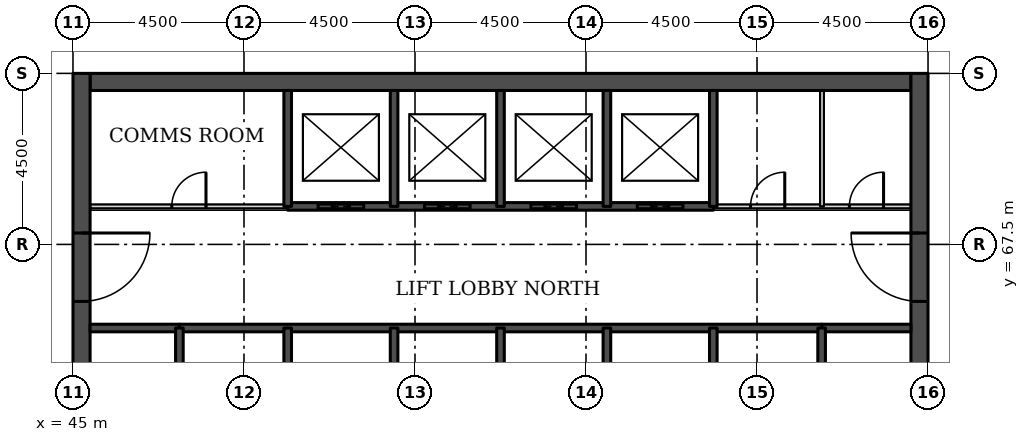
"""IFC4 building model, lengths in metres.
Left out: names, types, materials, properties, quantities, classifications, styles, units other than length and angle.
Written with IfcOpenShell. Run it as: python <this file> out.ifc"""

import sys

from ifc_helpers import new_model, si_unit, direction, frame, frame_2d, origin, place, context, subcontext, project, spatial, rectangle, extrude, element, fill, save


model = new_model("IFC4")
c1 = context("Model", 3, precision=1e-05, world=origin(), true_north=direction((0.0, 1.0)))
c2 = subcontext(c1, "Body", "Model", "MODEL_VIEW")
j1 = project(units=[si_unit("LENGTHUNIT", "METRE"), si_unit("PLANEANGLEUNIT", "RADIAN")], contexts=[c1])
p1 = place(None, origin())
s1 = spatial("IfcSite", under=j1, at=p1, CompositionType="ELEMENT")
p2 = place(p1, origin())
s2 = spatial("IfcBuilding", under=s1, at=p2, CompositionType="ELEMENT")
p3 = place(p2, frame((0.0, 0.0, 93.7)))
s3 = spatial("IfcBuildingStorey", under=s2, at=p3, CompositionType="ELEMENT", Elevation=93.7)
p4 = place(p3, frame((45.45, 71.775, 0.0), z_axis=(0.0, 0.0, 1.0), x_axis=(1.0, 0.0, 0.0)))
e1 = element("IfcWall", 1, at=p4, inside=s3, PredefinedType="SHEAR", context=c2, shape_type="SweptSolid", body=[
    extrude(rectangle(XDim=21.6, YDim=0.45, at=frame_2d((10.8, 0.0))), origin(), (0.0, 0.0, 1.0), 3.7),
])
p5 = place(p3, frame((45.225, 49.5, 0.0), z_axis=(0.0, 0.0, 1.0), x_axis=(0.0, 1.0, 0.0)))
e2 = element("IfcWall", 2, at=p5, inside=s3, PredefinedType="SHEAR", context=c2, shape_type="SweptSolid", body=[
    extrude(rectangle(XDim=22.5, YDim=0.45, at=frame_2d((11.25, 0.0))), origin(), (0.0, 0.0, 1.0), 3.7),
])
p6 = place(p5, frame((4.2, 0.0, 0.0)))
e3 = element("IfcOpeningElement", 3, at=p6, cuts=e2, PredefinedType="OPENING", context=c2, shape_type="SweptSolid", body=[
    extrude(rectangle(XDim=1.8, YDim=2.1, at=frame_2d((0.9, 1.05))), frame((0.0, 0.235, 0.0), z_axis=(0.0, -1.0, 0.0), x_axis=(1.0, 0.0, 0.0)), (0.0, 0.0, 1.0), 0.47),
])
p7 = place(p5, frame((6.9, 0.0, 0.0)))
e4 = element("IfcOpeningElement", 4, at=p7, cuts=e2, PredefinedType="OPENING", context=c2, shape_type="SweptSolid", body=[
    extrude(rectangle(XDim=1.1, YDim=2.1, at=frame_2d((0.55, 1.05))), frame((0.0, 0.235, 0.0), z_axis=(0.0, -1.0, 0.0), x_axis=(1.0, 0.0, 0.0)), (0.0, 0.0, 1.0), 0.47),
])
p8 = place(p5, frame((13.6, 0.0, 0.0)))
e5 = element("IfcOpeningElement", 5, at=p8, cuts=e2, PredefinedType="OPENING", context=c2, shape_type="SweptSolid", body=[
    extrude(rectangle(XDim=1.1, YDim=2.1, at=frame_2d((0.55, 1.05))), frame((0.0, 0.235, 0.0), z_axis=(0.0, -1.0, 0.0), x_axis=(1.0, 0.0, 0.0)), (0.0, 0.0, 1.0), 0.47),
])
p9 = place(p5, frame((16.5, 0.0, 0.0)))
e6 = element("IfcOpeningElement", 6, at=p9, cuts=e2, PredefinedType="OPENING", context=c2, shape_type="SweptSolid", body=[
    extrude(rectangle(XDim=1.8, YDim=2.1, at=frame_2d((0.9, 1.05))), frame((0.0, 0.235, 0.0), z_axis=(0.0, -1.0, 0.0), x_axis=(1.0, 0.0, 0.0)), (0.0, 0.0, 1.0), 0.47),
])
p10 = place(p3, frame((67.275, 49.5, 0.0), z_axis=(0.0, 0.0, 1.0), x_axis=(0.0, 1.0, 0.0)))
e7 = element("IfcWall", 7, at=p10, inside=s3, PredefinedType="SHEAR", context=c2, shape_type="SweptSolid", body=[
    extrude(rectangle(XDim=22.5, YDim=0.45, at=frame_2d((11.25, 0.0))), origin(), (0.0, 0.0, 1.0), 3.7),
])
p11 = place(p10, frame((4.2, 0.0, 0.0)))
e8 = element("IfcOpeningElement", 8, at=p11, cuts=e7, PredefinedType="OPENING", context=c2, shape_type="SweptSolid", body=[
    extrude(rectangle(XDim=1.8, YDim=2.1, at=frame_2d((0.9, 1.05))), frame((0.0, 0.235, 0.0), z_axis=(0.0, -1.0, 0.0), x_axis=(1.0, 0.0, 0.0)), (0.0, 0.0, 1.0), 0.47),
])
p12 = place(p10, frame((6.9, 0.0, 0.0)))
e9 = element("IfcOpeningElement", 9, at=p12, cuts=e7, PredefinedType="OPENING", context=c2, shape_type="SweptSolid", body=[
    extrude(rectangle(XDim=1.1, YDim=2.1, at=frame_2d((0.55, 1.05))), frame((0.0, 0.235, 0.0), z_axis=(0.0, -1.0, 0.0), x_axis=(1.0, 0.0, 0.0)), (0.0, 0.0, 1.0), 0.47),
])
p13 = place(p10, frame((13.6, 0.0, 0.0)))
e10 = element("IfcOpeningElement", 10, at=p13, cuts=e7, PredefinedType="OPENING", context=c2, shape_type="SweptSolid", body=[
    extrude(rectangle(XDim=1.1, YDim=2.1, at=frame_2d((0.55, 1.05))), frame((0.0, 0.235, 0.0), z_axis=(0.0, -1.0, 0.0), x_axis=(1.0, 0.0, 0.0)), (0.0, 0.0, 1.0), 0.47),
])
p14 = place(p10, frame((16.5, 0.0, 0.0)))
e11 = element("IfcOpeningElement", 11, at=p14, cuts=e7, PredefinedType="OPENING", context=c2, shape_type="SweptSolid", body=[
    extrude(rectangle(XDim=1.8, YDim=2.1, at=frame_2d((0.9, 1.05))), frame((0.0, 0.235, 0.0), z_axis=(0.0, -1.0, 0.0), x_axis=(1.0, 0.0, 0.0)), (0.0, 0.0, 1.0), 0.47),
])
for number, where, z_axis, x_axis in (
    (12, (45.45, 65.3, 0.0), (0.0, 0.0, 1.0), (1.0, 0.0, 0.0)),
    (13, (64.7, 65.3, 0.0), (0.0, 0.0, 1.0), (1.0, 0.0, 0.0)),
):
    element("IfcWall", number, at=place(p3, frame(where, z_axis=z_axis, x_axis=x_axis)), inside=s3, PredefinedType="SOLIDWALL", context=c2, shape_type="SweptSolid", body=[
        extrude(rectangle(XDim=2.35, YDim=0.2, at=frame_2d((1.175, 0.0))), origin(), (0.0, 0.0, 1.0), 3.55),
    ])
p15 = place(p3, frame((47.8, 65.3, 0.0), z_axis=(0.0, 0.0, 1.0), x_axis=(1.0, 0.0, 0.0)))
e14 = element("IfcWall", 14, at=p15, inside=s3, PredefinedType="SOLIDWALL", context=c2, shape_type="SweptSolid", body=[
    extrude(rectangle(XDim=16.9, YDim=0.2, at=frame_2d((8.45, 0.0))), origin(), (0.0, 0.0, 1.0), 3.55),
])
p16 = place(p3, frame((45.45, 68.5, 0.0), z_axis=(0.0, 0.0, 1.0), x_axis=(1.0, 0.0, 0.0)))
e15 = element("IfcWall", 15, at=p16, inside=s3, PredefinedType="PARTITIONING", context=c2, shape_type="SweptSolid", body=[
    extrude(rectangle(XDim=5.2, YDim=0.1, at=frame_2d((2.6, 0.0))), origin(), (0.0, 0.0, 1.0), 3.55),
])
p17 = place(p16, frame((2.15, 0.0, 0.0)))
e16 = element("IfcOpeningElement", 16, at=p17, cuts=e15, PredefinedType="OPENING", context=c2, shape_type="SweptSolid", body=[
    extrude(rectangle(XDim=0.9, YDim=2.1, at=frame_2d((0.45, 1.05))), frame((0.0, 0.06, 0.0), z_axis=(0.0, -1.0, 0.0), x_axis=(1.0, 0.0, 0.0)), (0.0, 0.0, 1.0), 0.12),
])
p18 = place(p3, frame((61.85, 68.5, 0.0), z_axis=(0.0, 0.0, 1.0), x_axis=(1.0, 0.0, 0.0)))
e17 = element("IfcWall", 17, at=p18, inside=s3, PredefinedType="PARTITIONING", context=c2, shape_type="SweptSolid", body=[
    extrude(rectangle(XDim=5.2, YDim=0.1, at=frame_2d((2.6, 0.0))), origin(), (0.0, 0.0, 1.0), 3.55),
])
p19 = place(p18, frame((3.58, 0.0, 0.0)))
e18 = element("IfcOpeningElement", 18, at=p19, cuts=e17, PredefinedType="OPENING", context=c2, shape_type="SweptSolid", body=[
    extrude(rectangle(XDim=0.9, YDim=2.1, at=frame_2d((0.45, 1.05))), frame((0.0, 0.06, 0.0), z_axis=(0.0, -1.0, 0.0), x_axis=(1.0, 0.0, 0.0)), (0.0, 0.0, 1.0), 0.12),
])
p20 = place(p18, frame((0.98, 0.0, 0.0)))
e19 = element("IfcOpeningElement", 19, at=p20, cuts=e17, PredefinedType="OPENING", context=c2, shape_type="SweptSolid", body=[
    extrude(rectangle(XDim=0.9, YDim=2.1, at=frame_2d((0.45, 1.05))), frame((0.0, 0.06, 0.0), z_axis=(0.0, -1.0, 0.0), x_axis=(1.0, 0.0, 0.0)), (0.0, 0.0, 1.0), 0.12),
])
p21 = place(p3, frame((50.65, 68.5, 0.0), z_axis=(0.0, 0.0, 1.0), x_axis=(1.0, 0.0, 0.0)))
e20 = element("IfcWall", 20, at=p21, inside=s3, PredefinedType="SOLIDWALL", context=c2, shape_type="SweptSolid", body=[
    extrude(rectangle(XDim=11.2, YDim=0.2, at=frame_2d((5.6, 0.0))), origin(), (0.0, 0.0, 1.0), 3.55),
])
p22 = place(p21, frame((0.8, 0.0, 0.0)))
e21 = element("IfcOpeningElement", 21, at=p22, cuts=e20, PredefinedType="OPENING", context=c2, shape_type="SweptSolid", body=[
    extrude(rectangle(XDim=1.2, YDim=2.1, at=frame_2d((0.6, 1.05))), frame((0.0, 0.11, 0.0), z_axis=(0.0, -1.0, 0.0), x_axis=(1.0, 0.0, 0.0)), (0.0, 0.0, 1.0), 0.22),
])
p23 = place(p21, frame((3.6, 0.0, 0.0)))
e22 = element("IfcOpeningElement", 22, at=p23, cuts=e20, PredefinedType="OPENING", context=c2, shape_type="SweptSolid", body=[
    extrude(rectangle(XDim=1.2, YDim=2.1, at=frame_2d((0.6, 1.05))), frame((0.0, 0.11, 0.0), z_axis=(0.0, -1.0, 0.0), x_axis=(1.0, 0.0, 0.0)), (0.0, 0.0, 1.0), 0.22),
])
p24 = place(p21, frame((6.4, 0.0, 0.0)))
e23 = element("IfcOpeningElement", 23, at=p24, cuts=e20, PredefinedType="OPENING", context=c2, shape_type="SweptSolid", body=[
    extrude(rectangle(XDim=1.2, YDim=2.1, at=frame_2d((0.6, 1.05))), frame((0.0, 0.11, 0.0), z_axis=(0.0, -1.0, 0.0), x_axis=(1.0, 0.0, 0.0)), (0.0, 0.0, 1.0), 0.22),
])
p25 = place(p21, frame((9.2, 0.0, 0.0)))
e24 = element("IfcOpeningElement", 24, at=p25, cuts=e20, PredefinedType="OPENING", context=c2, shape_type="SweptSolid", body=[
    extrude(rectangle(XDim=1.2, YDim=2.1, at=frame_2d((0.6, 1.05))), frame((0.0, 0.11, 0.0), z_axis=(0.0, -1.0, 0.0), x_axis=(1.0, 0.0, 0.0)), (0.0, 0.0, 1.0), 0.22),
])
p26 = place(p3, frame((47.8, 62.0, 0.0), z_axis=(0.0, 0.0, 1.0), x_axis=(0.0, 1.0, 0.0)))
e25 = element("IfcWall", 25, at=p26, inside=s3, PredefinedType="SOLIDWALL", context=c2, shape_type="SweptSolid", body=[
    extrude(rectangle(XDim=3.3, YDim=0.2, at=frame_2d((1.65, 0.0))), origin(), (0.0, 0.0, 1.0), 3.55),
])
p27 = place(p26, frame((1.1, 0.0, 0.0)))
e26 = element("IfcOpeningElement", 26, at=p27, cuts=e25, PredefinedType="OPENING", context=c2, shape_type="SweptSolid", body=[
    extrude(rectangle(XDim=1.1, YDim=2.1, at=frame_2d((0.55, 1.05))), frame((0.0, 0.11, 0.0), z_axis=(0.0, -1.0, 0.0), x_axis=(1.0, 0.0, 0.0)), (0.0, 0.0, 1.0), 0.22),
])
p28 = place(p3, frame((50.65, 62.0, 0.0), z_axis=(0.0, 0.0, 1.0), x_axis=(0.0, 1.0, 0.0)))
e27 = element("IfcWall", 27, at=p28, inside=s3, PredefinedType="SOLIDWALL", context=c2, shape_type="SweptSolid", body=[
    extrude(rectangle(XDim=3.3, YDim=0.2, at=frame_2d((1.65, 0.0))), origin(), (0.0, 0.0, 1.0), 3.55),
])
p29 = place(p3, frame((50.65, 68.5, 0.0), z_axis=(0.0, 0.0, 1.0), x_axis=(0.0, 1.0, 0.0)))
e28 = element("IfcWall", 28, at=p29, inside=s3, PredefinedType="SOLIDWALL", context=c2, shape_type="SweptSolid", body=[
    extrude(rectangle(XDim=3.05, YDim=0.2, at=frame_2d((1.525, 0.0))), origin(), (0.0, 0.0, 1.0), 3.55),
])
p30 = place(p3, frame((53.45, 62.5, 0.0), z_axis=(0.0, 0.0, 1.0), x_axis=(0.0, 1.0, 0.0)))
e29 = element("IfcWall", 29, at=p30, inside=s3, PredefinedType="SOLIDWALL", context=c2, shape_type="SweptSolid", body=[
    extrude(rectangle(XDim=2.8, YDim=0.2, at=frame_2d((1.4, 0.0))), origin(), (0.0, 0.0, 1.0), 3.55),
])
p31 = place(p3, frame((53.45, 68.5, 0.0), z_axis=(0.0, 0.0, 1.0), x_axis=(0.0, 1.0, 0.0)))
e30 = element("IfcWall", 30, at=p31, inside=s3, PredefinedType="SOLIDWALL", context=c2, shape_type="SweptSolid", body=[
    extrude(rectangle(XDim=3.05, YDim=0.2, at=frame_2d((1.525, 0.0))), origin(), (0.0, 0.0, 1.0), 3.55),
])
p32 = place(p3, frame((56.25, 62.5, 0.0), z_axis=(0.0, 0.0, 1.0), x_axis=(0.0, 1.0, 0.0)))
e31 = element("IfcWall", 31, at=p32, inside=s3, PredefinedType="SOLIDWALL", context=c2, shape_type="SweptSolid", body=[
    extrude(rectangle(XDim=2.8, YDim=0.2, at=frame_2d((1.4, 0.0))), origin(), (0.0, 0.0, 1.0), 3.55),
])
p33 = place(p3, frame((56.25, 68.5, 0.0), z_axis=(0.0, 0.0, 1.0), x_axis=(0.0, 1.0, 0.0)))
e32 = element("IfcWall", 32, at=p33, inside=s3, PredefinedType="SOLIDWALL", context=c2, shape_type="SweptSolid", body=[
    extrude(rectangle(XDim=3.05, YDim=0.2, at=frame_2d((1.525, 0.0))), origin(), (0.0, 0.0, 1.0), 3.55),
])
p34 = place(p3, frame((59.05, 62.5, 0.0), z_axis=(0.0, 0.0, 1.0), x_axis=(0.0, 1.0, 0.0)))
e33 = element("IfcWall", 33, at=p34, inside=s3, PredefinedType="SOLIDWALL", context=c2, shape_type="SweptSolid", body=[
    extrude(rectangle(XDim=2.8, YDim=0.2, at=frame_2d((1.4, 0.0))), origin(), (0.0, 0.0, 1.0), 3.55),
])
p35 = place(p3, frame((59.05, 68.5, 0.0), z_axis=(0.0, 0.0, 1.0), x_axis=(0.0, 1.0, 0.0)))
e34 = element("IfcWall", 34, at=p35, inside=s3, PredefinedType="SOLIDWALL", context=c2, shape_type="SweptSolid", body=[
    extrude(rectangle(XDim=3.05, YDim=0.2, at=frame_2d((1.525, 0.0))), origin(), (0.0, 0.0, 1.0), 3.55),
])
p36 = place(p3, frame((61.85, 62.0, 0.0), z_axis=(0.0, 0.0, 1.0), x_axis=(0.0, 1.0, 0.0)))
e35 = element("IfcWall", 35, at=p36, inside=s3, PredefinedType="SOLIDWALL", context=c2, shape_type="SweptSolid", body=[
    extrude(rectangle(XDim=3.3, YDim=0.2, at=frame_2d((1.65, 0.0))), origin(), (0.0, 0.0, 1.0), 3.55),
])
p37 = place(p3, frame((61.85, 68.5, 0.0), z_axis=(0.0, 0.0, 1.0), x_axis=(0.0, 1.0, 0.0)))
e36 = element("IfcWall", 36, at=p37, inside=s3, PredefinedType="SOLIDWALL", context=c2, shape_type="SweptSolid", body=[
    extrude(rectangle(XDim=3.05, YDim=0.2, at=frame_2d((1.525, 0.0))), origin(), (0.0, 0.0, 1.0), 3.55),
])
p38 = place(p3, frame((64.7, 62.0, 0.0), z_axis=(0.0, 0.0, 1.0), x_axis=(0.0, 1.0, 0.0)))
e37 = element("IfcWall", 37, at=p38, inside=s3, PredefinedType="SOLIDWALL", context=c2, shape_type="SweptSolid", body=[
    extrude(rectangle(XDim=3.3, YDim=0.2, at=frame_2d((1.65, 0.0))), origin(), (0.0, 0.0, 1.0), 3.55),
])
p39 = place(p38, frame((1.1, 0.0, 0.0)))
e38 = element("IfcOpeningElement", 38, at=p39, cuts=e37, PredefinedType="OPENING", context=c2, shape_type="SweptSolid", body=[
    extrude(rectangle(XDim=1.1, YDim=2.1, at=frame_2d((0.55, 1.05))), frame((0.0, 0.11, 0.0), z_axis=(0.0, -1.0, 0.0), x_axis=(1.0, 0.0, 0.0)), (0.0, 0.0, 1.0), 0.22),
])
p40 = place(p3, frame((64.71, 68.5, 0.0), z_axis=(0.0, 0.0, 1.0), x_axis=(0.0, 1.0, 0.0)))
e39 = element("IfcWall", 39, at=p40, inside=s3, PredefinedType="PARTITIONING", context=c2, shape_type="SweptSolid", body=[
    extrude(rectangle(XDim=3.05, YDim=0.1, at=frame_2d((1.525, 0.0))), origin(), (0.0, 0.0, 1.0), 3.55),
])
p41 = place(p22, origin())
e40 = element("IfcDoor", 40, at=p41, inside=s3, OperationType="DOUBLE_DOOR_SLIDING", PredefinedType="DOOR", context=c2, shape_type="SweptSolid", body=[
    extrude(rectangle(XDim=1.2, YDim=2.1, at=frame_2d((0.6, 1.05))), frame((0.0, 0.025, 0.0), z_axis=(0.0, -1.0, 0.0), x_axis=(1.0, 0.0, 0.0)), (0.0, 0.0, 1.0), 0.05),
])
fill(e21, e40)
p42 = place(p23, origin())
e41 = element("IfcDoor", 41, at=p42, inside=s3, OperationType="DOUBLE_DOOR_SLIDING", PredefinedType="DOOR", context=c2, shape_type="SweptSolid", body=[
    extrude(rectangle(XDim=1.2, YDim=2.1, at=frame_2d((0.6, 1.05))), frame((0.0, 0.025, 0.0), z_axis=(0.0, -1.0, 0.0), x_axis=(1.0, 0.0, 0.0)), (0.0, 0.0, 1.0), 0.05),
])
fill(e22, e41)
p43 = place(p24, origin())
e42 = element("IfcDoor", 42, at=p43, inside=s3, OperationType="DOUBLE_DOOR_SLIDING", PredefinedType="DOOR", context=c2, shape_type="SweptSolid", body=[
    extrude(rectangle(XDim=1.2, YDim=2.1, at=frame_2d((0.6, 1.05))), frame((0.0, 0.025, 0.0), z_axis=(0.0, -1.0, 0.0), x_axis=(1.0, 0.0, 0.0)), (0.0, 0.0, 1.0), 0.05),
])
fill(e23, e42)
p44 = place(p25, origin())
e43 = element("IfcDoor", 43, at=p44, inside=s3, OperationType="DOUBLE_DOOR_SLIDING", PredefinedType="DOOR", context=c2, shape_type="SweptSolid", body=[
    extrude(rectangle(XDim=1.2, YDim=2.1, at=frame_2d((0.6, 1.05))), frame((0.0, 0.025, 0.0), z_axis=(0.0, -1.0, 0.0), x_axis=(1.0, 0.0, 0.0)), (0.0, 0.0, 1.0), 0.05),
])
fill(e24, e43)
p45 = place(p9, frame((1.8, 0.0, 0.0), z_axis=(0.0, 0.0, 1.0), x_axis=(-1.0, 0.0, 0.0)))
e44 = element("IfcDoor", 44, at=p45, inside=s3, OperationType="SINGLE_SWING_LEFT", PredefinedType="DOOR", context=c2, shape_type="SweptSolid", body=[
    extrude(rectangle(XDim=1.8, YDim=2.1, at=frame_2d((0.9, 1.05))), frame((0.0, 0.025, 0.0), z_axis=(0.0, -1.0, 0.0), x_axis=(1.0, 0.0, 0.0)), (0.0, 0.0, 1.0), 0.05),
])
fill(e6, e44)
p46 = place(p14, origin())
e45 = element("IfcDoor", 45, at=p46, inside=s3, OperationType="SINGLE_SWING_RIGHT", PredefinedType="DOOR", context=c2, shape_type="SweptSolid", body=[
    extrude(rectangle(XDim=1.8, YDim=2.1, at=frame_2d((0.9, 1.05))), frame((0.0, 0.025, 0.0), z_axis=(0.0, -1.0, 0.0), x_axis=(1.0, 0.0, 0.0)), (0.0, 0.0, 1.0), 0.05),
])
fill(e11, e45)
p47 = place(p19, origin())
e46 = element("IfcDoor", 46, at=p47, inside=s3, OperationType="SINGLE_SWING_RIGHT", PredefinedType="DOOR", context=c2, shape_type="SweptSolid", body=[
    extrude(rectangle(XDim=0.9, YDim=2.1, at=frame_2d((0.45, 1.05))), frame((0.0, 0.025, 0.0), z_axis=(0.0, -1.0, 0.0), x_axis=(1.0, 0.0, 0.0)), (0.0, 0.0, 1.0), 0.05),
])
fill(e18, e46)
p48 = place(p20, origin())
e47 = element("IfcDoor", 47, at=p48, inside=s3, OperationType="SINGLE_SWING_RIGHT", PredefinedType="DOOR", context=c2, shape_type="SweptSolid", body=[
    extrude(rectangle(XDim=0.9, YDim=2.1, at=frame_2d((0.45, 1.05))), frame((0.0, 0.025, 0.0), z_axis=(0.0, -1.0, 0.0), x_axis=(1.0, 0.0, 0.0)), (0.0, 0.0, 1.0), 0.05),
])
fill(e19, e47)
p49 = place(p17, origin())
e48 = element("IfcDoor", 48, at=p49, inside=s3, OperationType="SINGLE_SWING_RIGHT", PredefinedType="DOOR", context=c2, shape_type="SweptSolid", body=[
    extrude(rectangle(XDim=0.9, YDim=2.1, at=frame_2d((0.45, 1.05))), frame((0.0, 0.025, 0.0), z_axis=(0.0, -1.0, 0.0), x_axis=(1.0, 0.0, 0.0)), (0.0, 0.0, 1.0), 0.05),
])
fill(e16, e48)
save(model, sys.argv[1])
